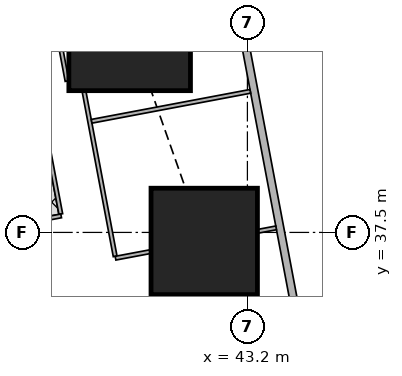
"""IFC4 building model, lengths in metres.
Left out: names, types, materials, properties, quantities, classifications, styles, units other than length and angle.
Written with IfcOpenShell. Run it as: python <this file> out.ifc"""

import sys

from ifc_helpers import new_model, si_unit, direction, frame, frame_2d, origin, origin_2d, place, context, subcontext, project, spatial, rectangle, extrude, element, fill, save


model = new_model("IFC4")
c1 = context("Model", 3, precision=1e-05, world=origin(), true_north=direction((0.0, 1.0)))
c2 = subcontext(c1, "Body", "Model", "MODEL_VIEW")
j1 = project(units=[si_unit("LENGTHUNIT", "METRE"), si_unit("PLANEANGLEUNIT", "RADIAN")], contexts=[c1])
p1 = place(None, origin())
s1 = spatial("IfcSite", under=j1, at=p1, CompositionType="ELEMENT")
p2 = place(p1, origin())
s2 = spatial("IfcBuilding", under=s1, at=p2, CompositionType="ELEMENT")
p3 = place(p2, frame((0.0, 0.0, 42.5)))
s3 = spatial("IfcBuildingStorey", under=s2, at=p3, CompositionType="ELEMENT", Elevation=42.5)
p4 = place(p3, frame((42.064, 37.263, 0.0), z_axis=(0.0, 0.0, 1.0), x_axis=(1.0, 0.0, 0.0)))
e1 = element("IfcColumn", 1, at=p4, inside=s3, PredefinedType="COLUMN", context=c2, shape_type="SweptSolid", body=[
    extrude(rectangle(XDim=2.8, YDim=2.8, at=origin_2d()), origin(), (0.0, 0.0, 1.0), 3.75),
])
p5 = place(p3, frame((40.102, 42.83, 0.0), z_axis=(0.0, 0.0, 1.0), x_axis=(1.0, 0.0, 0.0)))
e2 = element("IfcColumn", 2, at=p5, inside=s3, PredefinedType="COLUMN", context=c2, shape_type="SweptSolid", body=[
    extrude(rectangle(XDim=3.2, YDim=3.2, at=origin_2d()), origin(), (0.0, 0.0, 1.0), 3.75),
])
p6 = place(p3, frame((50.653, 2.703, 0.0), z_axis=(0.0, 0.0, 1.0), x_axis=(-0.185612026696, 0.982623109613, 0.0)))
e3 = element("IfcWall", 3, at=p6, inside=s3, PredefinedType="SOLIDWALL", context=c2, shape_type="SweptSolid", body=[
    extrude(rectangle(XDim=41.393, YDim=0.2, at=frame_2d((20.697, 0.0))), origin(), (0.0, 0.0, 1.0), 3.5),
])
p7 = place(p6, frame((1.633, 0.0, 0.9)))
e4 = element("IfcOpeningElement", 4, at=p7, cuts=e3, PredefinedType="OPENING", context=c2, shape_type="SweptSolid", body=[
    extrude(rectangle(XDim=1.8, YDim=1.5, at=frame_2d((0.9, 0.75))), frame((0.0, 0.11, 0.0), z_axis=(0.0, -1.0, 0.0), x_axis=(1.0, 0.0, 0.0)), (0.0, 0.0, 1.0), 0.22),
])
p8 = place(p6, frame((6.032, 0.0, 0.9)))
e5 = element("IfcOpeningElement", 5, at=p8, cuts=e3, PredefinedType="OPENING", context=c2, shape_type="SweptSolid", body=[
    extrude(rectangle(XDim=1.8, YDim=1.5, at=frame_2d((0.9, 0.75))), frame((0.0, 0.11, 0.0), z_axis=(0.0, -1.0, 0.0), x_axis=(1.0, 0.0, 0.0)), (0.0, 0.0, 1.0), 0.22),
])
p9 = place(p6, frame((9.848, 0.0, 0.9)))
e6 = element("IfcOpeningElement", 6, at=p9, cuts=e3, PredefinedType="OPENING", context=c2, shape_type="SweptSolid", body=[
    extrude(rectangle(XDim=1.8, YDim=1.5, at=frame_2d((0.9, 0.75))), frame((0.0, 0.11, 0.0), z_axis=(0.0, -1.0, 0.0), x_axis=(1.0, 0.0, 0.0)), (0.0, 0.0, 1.0), 0.22),
])
p10 = place(p6, frame((17.481, 0.0, 0.9)))
e7 = element("IfcOpeningElement", 7, at=p10, cuts=e3, PredefinedType="OPENING", context=c2, shape_type="SweptSolid", body=[
    extrude(rectangle(XDim=1.8, YDim=1.5, at=frame_2d((0.9, 0.75))), frame((0.0, 0.11, 0.0), z_axis=(0.0, -1.0, 0.0), x_axis=(1.0, 0.0, 0.0)), (0.0, 0.0, 1.0), 0.22),
])
p11 = place(p6, frame((21.297, 0.0, 0.9)))
e8 = element("IfcOpeningElement", 8, at=p11, cuts=e3, PredefinedType="OPENING", context=c2, shape_type="SweptSolid", body=[
    extrude(rectangle(XDim=1.8, YDim=1.5, at=frame_2d((0.9, 0.75))), frame((0.0, 0.11, 0.0), z_axis=(0.0, -1.0, 0.0), x_axis=(1.0, 0.0, 0.0)), (0.0, 0.0, 1.0), 0.22),
])
p12 = place(p6, frame((25.113, 0.0, 0.9)))
e9 = element("IfcOpeningElement", 9, at=p12, cuts=e3, PredefinedType="OPENING", context=c2, shape_type="SweptSolid", body=[
    extrude(rectangle(XDim=1.8, YDim=1.5, at=frame_2d((0.9, 0.75))), frame((0.0, 0.11, 0.0), z_axis=(0.0, -1.0, 0.0), x_axis=(1.0, 0.0, 0.0)), (0.0, 0.0, 1.0), 0.22),
])
p13 = place(p6, frame((28.93, 0.0, 0.9)))
e10 = element("IfcOpeningElement", 10, at=p13, cuts=e3, PredefinedType="OPENING", context=c2, shape_type="SweptSolid", body=[
    extrude(rectangle(XDim=1.8, YDim=1.5, at=frame_2d((0.9, 0.75))), frame((0.0, 0.11, 0.0), z_axis=(0.0, -1.0, 0.0), x_axis=(1.0, 0.0, 0.0)), (0.0, 0.0, 1.0), 0.22),
])
p14 = place(p6, frame((32.746, 0.0, 0.9)))
e11 = element("IfcOpeningElement", 11, at=p14, cuts=e3, PredefinedType="OPENING", context=c2, shape_type="SweptSolid", body=[
    extrude(rectangle(XDim=1.8, YDim=1.5, at=frame_2d((0.9, 0.75))), frame((0.0, 0.11, 0.0), z_axis=(0.0, -1.0, 0.0), x_axis=(1.0, 0.0, 0.0)), (0.0, 0.0, 1.0), 0.22),
])
p15 = place(p6, frame((36.481, 0.0, 0.9)))
e12 = element("IfcOpeningElement", 12, at=p15, cuts=e3, PredefinedType="OPENING", context=c2, shape_type="SweptSolid", body=[
    extrude(rectangle(XDim=1.8, YDim=1.5, at=frame_2d((0.9, 0.75))), frame((0.0, 0.11, 0.0), z_axis=(0.0, -1.0, 0.0), x_axis=(1.0, 0.0, 0.0)), (0.0, 0.0, 1.0), 0.22),
])
p16 = place(p3, frame((33.68, 42.723, 0.0), z_axis=(0.0, 0.0, 1.0), x_axis=(0.185624129307, -0.98262082342, 0.0)))
e13 = element("IfcWall", 13, at=p16, inside=s3, PredefinedType="SOLIDWALL", context=c2, shape_type="SweptSolid", body=[
    extrude(rectangle(XDim=41.051, YDim=0.15, at=frame_2d((20.526, 0.0))), origin(), (0.0, 0.0, 1.0), 2.5),
])
p17 = place(p16, frame((7.73, 0.0, 0.0)))
e14 = element("IfcOpeningElement", 14, at=p17, cuts=e13, PredefinedType="OPENING", context=c2, shape_type="SweptSolid", body=[
    extrude(rectangle(XDim=1.0, YDim=2.1, at=frame_2d((0.5, 1.05))), frame((0.0, 0.085, 0.0), z_axis=(0.0, -1.0, 0.0), x_axis=(1.0, 0.0, 0.0)), (0.0, 0.0, 1.0), 0.17),
])
p18 = place(p16, frame((12.307, 0.0, 0.0)))
e15 = element("IfcOpeningElement", 15, at=p18, cuts=e13, PredefinedType="OPENING", context=c2, shape_type="SweptSolid", body=[
    extrude(rectangle(XDim=1.0, YDim=2.1, at=frame_2d((0.5, 1.05))), frame((0.0, 0.085, 0.0), z_axis=(0.0, -1.0, 0.0), x_axis=(1.0, 0.0, 0.0)), (0.0, 0.0, 1.0), 0.17),
])
p19 = place(p16, frame((19.938, 0.0, 0.0)))
e16 = element("IfcOpeningElement", 16, at=p19, cuts=e13, PredefinedType="OPENING", context=c2, shape_type="SweptSolid", body=[
    extrude(rectangle(XDim=1.0, YDim=2.1, at=frame_2d((0.5, 1.05))), frame((0.0, 0.085, 0.0), z_axis=(0.0, -1.0, 0.0), x_axis=(1.0, 0.0, 0.0)), (0.0, 0.0, 1.0), 0.17),
])
p20 = place(p16, frame((32.193, 0.0, 0.0)))
e17 = element("IfcOpeningElement", 17, at=p20, cuts=e13, PredefinedType="OPENING", context=c2, shape_type="SweptSolid", body=[
    extrude(rectangle(XDim=1.0, YDim=2.1, at=frame_2d((0.5, 1.05))), frame((0.0, 0.085, 0.0), z_axis=(0.0, -1.0, 0.0), x_axis=(1.0, 0.0, 0.0)), (0.0, 0.0, 1.0), 0.17),
])
p21 = place(p3, frame((38.454, 41.483, 0.0), z_axis=(0.0, 0.0, 1.0), x_axis=(-0.185609245326, 0.982623634994, 0.0)))
e18 = element("IfcWall", 18, at=p21, inside=s3, PredefinedType="PARTITIONING", context=c2, shape_type="SweptSolid", body=[
    extrude(rectangle(XDim=4.241, YDim=0.1, at=frame_2d((2.12, 0.0))), origin(), (0.0, 0.0, 1.0), 2.05),
])
p22 = place(p3, frame((38.899, 41.22, 0.0), z_axis=(0.0, 0.0, 1.0), x_axis=(0.185517409072, -0.982640977637, 0.0)))
e19 = element("IfcWall", 19, at=p22, inside=s3, PredefinedType="PARTITIONING", context=c2, shape_type="SweptSolid", body=[
    extrude(rectangle(XDim=4.426, YDim=0.1, at=frame_2d((2.213, 0.0))), origin(), (0.0, 0.0, 1.0), 3.5),
])
p23 = place(p22, frame((1.9, 0.0, 0.0)))
e20 = element("IfcOpeningElement", 20, at=p23, cuts=e19, PredefinedType="OPENING", context=c2, shape_type="SweptSolid", body=[
    extrude(rectangle(XDim=0.9, YDim=2.1, at=frame_2d((0.45, 1.05))), frame((0.0, 0.06, 0.0), z_axis=(0.0, -1.0, 0.0), x_axis=(1.0, 0.0, 0.0)), (0.0, 0.0, 1.0), 0.12),
])
p24 = place(p3, frame((37.514, 42.089, 0.0), z_axis=(0.0, 0.0, 1.0), x_axis=(0.185540945282, -0.982636533833, 0.0)))
e21 = element("IfcWall", 21, at=p24, inside=s3, PredefinedType="PARTITIONING", context=c2, shape_type="SweptSolid", body=[
    extrude(rectangle(XDim=4.178, YDim=0.1, at=frame_2d((2.089, 0.0))), origin(), (0.0, 0.0, 1.0), 3.5),
])
p25 = place(p24, frame((2.63, 0.0, 0.0)))
e22 = element("IfcOpeningElement", 22, at=p25, cuts=e21, PredefinedType="OPENING", context=c2, shape_type="SweptSolid", body=[
    extrude(rectangle(XDim=0.9, YDim=2.1, at=frame_2d((0.45, 1.05))), frame((0.0, 0.06, 0.0), z_axis=(0.0, -1.0, 0.0), x_axis=(1.0, 0.0, 0.0)), (0.0, 0.0, 1.0), 0.12),
])
p26 = place(p3, frame((43.277, 41.212, 0.0), z_axis=(0.0, 0.0, 1.0), x_axis=(-0.982665405803, -0.185387972203, 0.0)))
e23 = element("IfcWall", 23, at=p26, inside=s3, PredefinedType="PARTITIONING", context=c2, shape_type="SweptSolid", body=[
    extrude(rectangle(XDim=4.25, YDim=0.1, at=frame_2d((2.125, 0.0))), origin(), (0.0, 0.0, 1.0), 2.05),
])
p27 = place(p3, frame((43.955, 37.62, 0.0), z_axis=(0.0, 0.0, 1.0), x_axis=(-0.982543152073, -0.186034820164, 0.0)))
e24 = element("IfcWall", 24, at=p27, inside=s3, PredefinedType="PARTITIONING", context=c2, shape_type="SweptSolid", body=[
    extrude(rectangle(XDim=0.49, YDim=0.1, at=frame_2d((0.245, 0.0))), origin(), (0.0, 0.0, 1.0), 3.5),
])
p28 = place(p3, frame((40.654, 36.996, 0.0), z_axis=(0.0, 0.0, 1.0), x_axis=(-0.982716055164, -0.185119299163, 0.0)))
e25 = element("IfcWall", 25, at=p28, inside=s3, PredefinedType="PARTITIONING", context=c2, shape_type="SweptSolid", body=[
    extrude(rectangle(XDim=0.94, YDim=0.1, at=frame_2d((0.47, 0.0))), origin(), (0.0, 0.0, 1.0), 3.5),
])
p29 = place(p3, frame((38.299, 37.935, 0.0), z_axis=(0.0, 0.0, 1.0), x_axis=(-0.982680053146, -0.185310315822, 0.0)))
e26 = element("IfcWall", 26, at=p29, inside=s3, PredefinedType="PARTITIONING", context=c2, shape_type="SweptSolid", body=[
    extrude(rectangle(XDim=1.414, YDim=0.1, at=frame_2d((0.707, 0.0))), origin(), (0.0, 0.0, 1.0), 3.5),
])
p30 = place(p14, origin())
e27 = element("IfcWindow", 27, at=p30, inside=s3, PartitioningType="SINGLE_PANEL", PredefinedType="WINDOW", context=c2, shape_type="SweptSolid", body=[
    extrude(rectangle(XDim=1.8, YDim=1.5, at=frame_2d((0.9, 0.75))), frame((0.0, 0.03, 0.0), z_axis=(0.0, -1.0, 0.0), x_axis=(1.0, 0.0, 0.0)), (0.0, 0.0, 1.0), 0.06),
])
fill(e11, e27)
p31 = place(p15, origin())
e28 = element("IfcWindow", 28, at=p31, inside=s3, PartitioningType="SINGLE_PANEL", PredefinedType="WINDOW", context=c2, shape_type="SweptSolid", body=[
    extrude(rectangle(XDim=1.8, YDim=1.5, at=frame_2d((0.9, 0.75))), frame((0.0, 0.03, 0.0), z_axis=(0.0, -1.0, 0.0), x_axis=(1.0, 0.0, 0.0)), (0.0, 0.0, 1.0), 0.06),
])
fill(e12, e28)
p32 = place(p23, origin())
e29 = element("IfcDoor", 29, at=p32, inside=s3, OperationType="SINGLE_SWING_LEFT", PredefinedType="DOOR", context=c2, shape_type="SweptSolid", body=[
    extrude(rectangle(XDim=0.9, YDim=2.1, at=frame_2d((0.45, 1.05))), frame((0.0, 0.025, 0.0), z_axis=(0.0, -1.0, 0.0), x_axis=(1.0, 0.0, 0.0)), (0.0, 0.0, 1.0), 0.05),
])
fill(e20, e29)
p33 = place(p25, origin())
e30 = element("IfcDoor", 30, at=p33, inside=s3, OperationType="SINGLE_SWING_LEFT", PredefinedType="DOOR", context=c2, shape_type="SweptSolid", body=[
    extrude(rectangle(XDim=0.9, YDim=2.1, at=frame_2d((0.45, 1.05))), frame((0.0, 0.025, 0.0), z_axis=(0.0, -1.0, 0.0), x_axis=(1.0, 0.0, 0.0)), (0.0, 0.0, 1.0), 0.05),
])
fill(e22, e30)
save(model, sys.argv[1])
